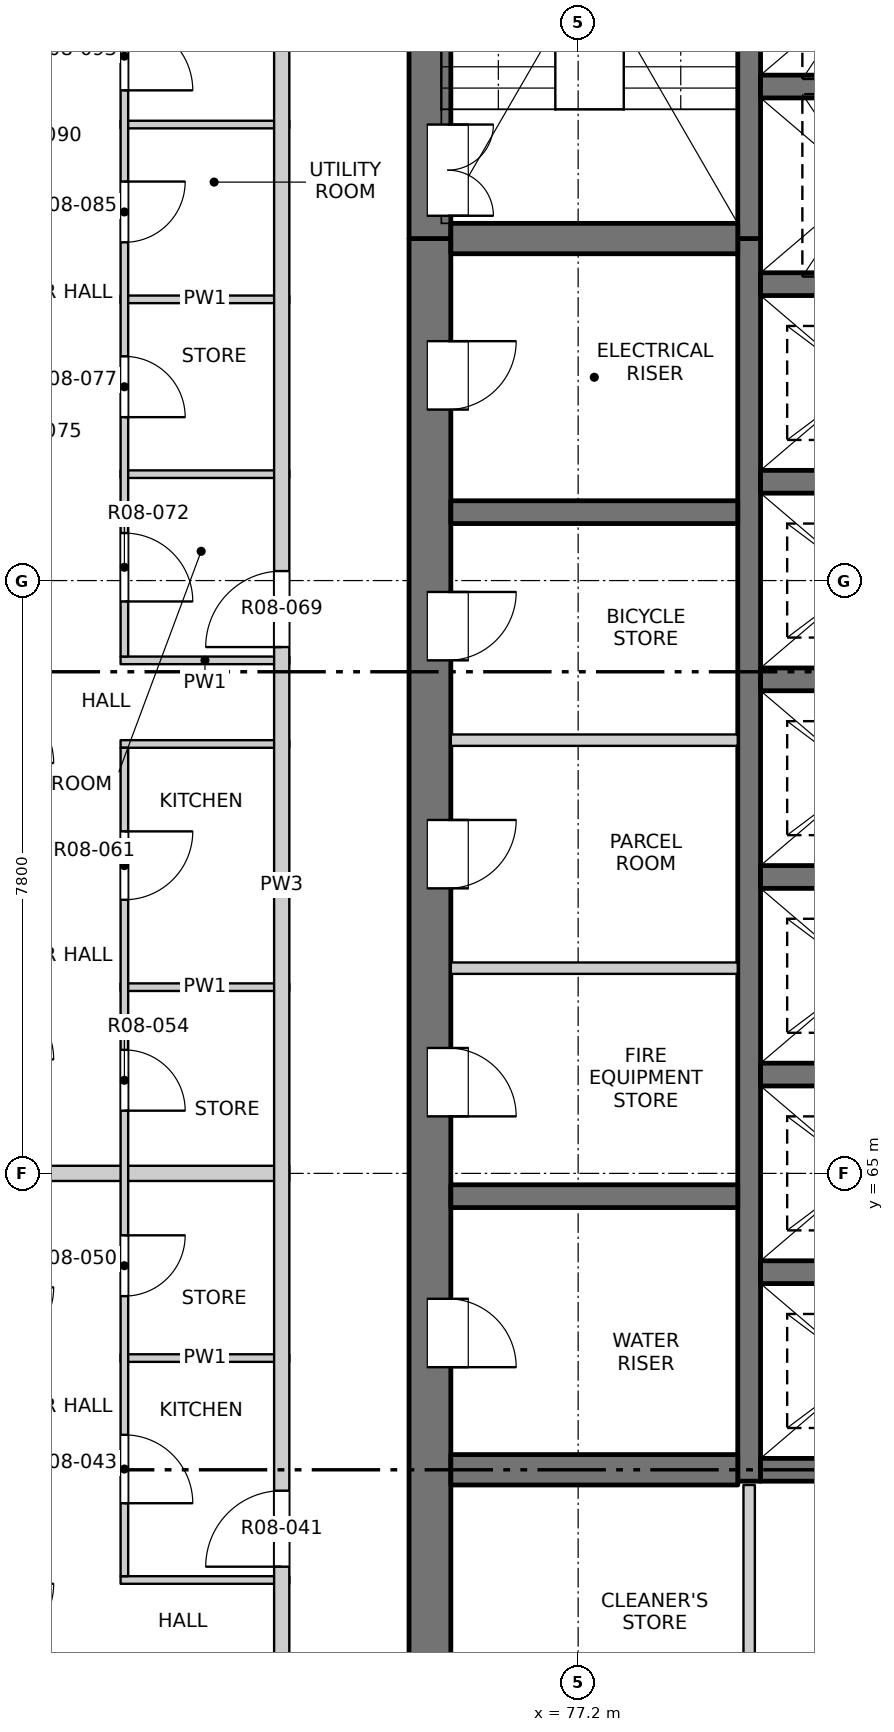
"""IFC4 building model, lengths in metres.
Left out: names, types, materials, properties, quantities, classifications, styles, units other than length and angle.
Written with IfcOpenShell. Run it as: python <this file> out.ifc"""

import sys

from ifc_helpers import new_model, si_unit, direction, frame, frame_2d, origin, place, context, subcontext, project, spatial, rectangle, extrude, element, fill, save


model = new_model("IFC4")
c1 = context("Model", 3, precision=1e-05, world=origin(), true_north=direction((0.0, 1.0)))
c2 = subcontext(c1, "Body", "Model", "MODEL_VIEW")
j1 = project(units=[si_unit("LENGTHUNIT", "METRE"), si_unit("PLANEANGLEUNIT", "RADIAN")], contexts=[c1])
p1 = place(None, origin())
s1 = spatial("IfcSite", under=j1, at=p1, CompositionType="ELEMENT")
p2 = place(p1, origin())
s2 = spatial("IfcBuilding", under=s1, at=p2, CompositionType="ELEMENT")
p3 = place(p2, frame((0.0, 0.0, 103.3)))
s3 = spatial("IfcBuildingStorey", under=s2, at=p3, CompositionType="ELEMENT", Elevation=103.3)
p4 = place(p3, frame((75.25, 54.975, -0.25), z_axis=(0.0, 0.0, 1.0), x_axis=(0.0, 1.0, 0.0)))
e1 = element("IfcWall", 1, at=p4, inside=s3, PredefinedType="SOLIDWALL", context=c2, shape_type="SweptSolid", body=[
    extrude(rectangle(XDim=22.325, YDim=0.55, at=frame_2d((11.163, 0.0))), origin(), (0.0, 0.0, 1.0), 3.4),
])
p5 = place(p4, frame((7.475, 0.0, 0.25)))
e2 = element("IfcOpeningElement", 2, at=p5, cuts=e1, PredefinedType="OPENING", context=c2, shape_type="SweptSolid", body=[
    extrude(rectangle(XDim=0.9, YDim=2.1, at=frame_2d((0.45, 1.05))), frame((0.0, 0.285, 0.0), z_axis=(0.0, -1.0, 0.0), x_axis=(1.0, 0.0, 0.0)), (0.0, 0.0, 1.0), 0.57),
])
p6 = place(p4, frame((10.775, 0.0, 0.25)))
e3 = element("IfcOpeningElement", 3, at=p6, cuts=e1, PredefinedType="OPENING", context=c2, shape_type="SweptSolid", body=[
    extrude(rectangle(XDim=0.9, YDim=2.1, at=frame_2d((0.45, 1.05))), frame((0.0, 0.285, 0.0), z_axis=(0.0, -1.0, 0.0), x_axis=(1.0, 0.0, 0.0)), (0.0, 0.0, 1.0), 0.57),
])
p7 = place(p4, frame((13.775, 0.0, 0.25)))
e4 = element("IfcOpeningElement", 4, at=p7, cuts=e1, PredefinedType="OPENING", context=c2, shape_type="SweptSolid", body=[
    extrude(rectangle(XDim=0.9, YDim=2.1, at=frame_2d((0.45, 1.05))), frame((0.0, 0.285, 0.0), z_axis=(0.0, -1.0, 0.0), x_axis=(1.0, 0.0, 0.0)), (0.0, 0.0, 1.0), 0.57),
])
p8 = place(p4, frame((16.775, 0.0, 0.25)))
e5 = element("IfcOpeningElement", 5, at=p8, cuts=e1, PredefinedType="OPENING", context=c2, shape_type="SweptSolid", body=[
    extrude(rectangle(XDim=0.9, YDim=2.1, at=frame_2d((0.45, 1.05))), frame((0.0, 0.285, 0.0), z_axis=(0.0, -1.0, 0.0), x_axis=(1.0, 0.0, 0.0)), (0.0, 0.0, 1.0), 0.57),
])
p9 = place(p4, frame((20.075, 0.0, 0.25)))
e6 = element("IfcOpeningElement", 6, at=p9, cuts=e1, PredefinedType="OPENING", context=c2, shape_type="SweptSolid", body=[
    extrude(rectangle(XDim=0.9, YDim=2.1, at=frame_2d((0.45, 1.05))), frame((0.0, 0.285, 0.0), z_axis=(0.0, -1.0, 0.0), x_axis=(1.0, 0.0, 0.0)), (0.0, 0.0, 1.0), 0.57),
])
p10 = place(p3, frame((75.25, 77.3, -0.25), z_axis=(0.0, 0.0, 1.0), x_axis=(0.0, 1.0, 0.0)))
e7 = element("IfcWall", 7, at=p10, inside=s3, PredefinedType="SOLIDWALL", context=c2, shape_type="SweptSolid", body=[
    extrude(rectangle(XDim=7.475, YDim=0.55, at=frame_2d((3.737, 0.0))), origin(), (0.0, 0.0, 1.0), 3.4),
])
p11 = place(p10, frame((0.3, 0.0, 0.25)))
e8 = element("IfcOpeningElement", 8, at=p11, cuts=e7, PredefinedType="OPENING", context=c2, shape_type="SweptSolid", body=[
    extrude(rectangle(XDim=1.2, YDim=2.1, at=frame_2d((0.6, 1.05))), frame((0.0, 0.285, 0.0), z_axis=(0.0, -1.0, 0.0), x_axis=(1.0, 0.0, 0.0)), (0.0, 0.0, 1.0), 0.57),
])
p12 = place(p3, frame((79.45, 60.95, -0.25), z_axis=(0.0, 0.0, 1.0), x_axis=(0.0, 1.0, 0.0)))
e9 = element("IfcWall", 9, at=p12, inside=s3, PredefinedType="SOLIDWALL", context=c2, shape_type="SweptSolid", body=[
    extrude(rectangle(XDim=16.35, YDim=0.3, at=frame_2d((8.175, 0.0))), origin(), (0.0, 0.0, 1.0), 3.4),
])
p13 = place(p3, frame((79.45, 77.3, -0.25), z_axis=(0.0, 0.0, 1.0), x_axis=(0.0, 1.0, 0.0)))
e10 = element("IfcWall", 10, at=p13, inside=s3, PredefinedType="SOLIDWALL", context=c2, shape_type="SweptSolid", body=[
    extrude(rectangle(XDim=6.925, YDim=0.3, at=frame_2d((3.462, 0.0))), origin(), (0.0, 0.0, 1.0), 3.4),
])
for number, where, z_axis, x_axis in (
    (11, (79.6, 61.1, -0.25), (0.0, 0.0, 1.0), (1.0, 0.0, 0.0)),
    (12, (79.6, 63.7, -0.25), (0.0, 0.0, 1.0), (1.0, 0.0, 0.0)),
    (13, (79.6, 66.3, -0.25), (0.0, 0.0, 1.0), (1.0, 0.0, 0.0)),
    (14, (79.6, 68.9, -0.25), (0.0, 0.0, 1.0), (1.0, 0.0, 0.0)),
    (15, (79.6, 71.5, -0.25), (0.0, 0.0, 1.0), (1.0, 0.0, 0.0)),
    (16, (79.6, 74.1, -0.25), (0.0, 0.0, 1.0), (1.0, 0.0, 0.0)),
    (17, (79.6, 76.7, -0.25), (0.0, 0.0, 1.0), (1.0, 0.0, 0.0)),
    (18, (79.6, 79.3, -0.25), (0.0, 0.0, 1.0), (1.0, 0.0, 0.0)),
):
    element("IfcWall", number, at=place(p3, frame(where, z_axis=z_axis, x_axis=x_axis)), inside=s3, PredefinedType="SOLIDWALL", context=c2, shape_type="SweptSolid", body=[
        extrude(rectangle(XDim=3.0, YDim=0.3, at=frame_2d((1.5, 0.0))), origin(), (0.0, 0.0, 1.0), 3.4),
    ])
p14 = place(p3, frame((75.525, 61.1, -0.25), z_axis=(0.0, 0.0, 1.0), x_axis=(1.0, 0.0, 0.0)))
e19 = element("IfcWall", 19, at=p14, inside=s3, PredefinedType="SOLIDWALL", context=c2, shape_type="SweptSolid", body=[
    extrude(rectangle(XDim=3.775, YDim=0.4, at=frame_2d((1.888, 0.0))), origin(), (0.0, 0.0, 1.0), 3.4),
])
for number, where, z_axis, x_axis in (
    (20, (75.525, 64.7, -0.25), (0.0, 0.0, 1.0), (1.0, 0.0, 0.0)),
    (21, (75.525, 73.7, -0.25), (0.0, 0.0, 1.0), (1.0, 0.0, 0.0)),
):
    element("IfcWall", number, at=place(p3, frame(where, z_axis=z_axis, x_axis=x_axis)), inside=s3, PredefinedType="SOLIDWALL", context=c2, shape_type="SweptSolid", body=[
        extrude(rectangle(XDim=3.775, YDim=0.3, at=frame_2d((1.888, 0.0))), origin(), (0.0, 0.0, 1.0), 3.4),
    ])
p15 = place(p3, frame((75.525, 77.3, -0.25), z_axis=(0.0, 0.0, 1.0), x_axis=(1.0, 0.0, 0.0)))
e22 = element("IfcWall", 22, at=p15, inside=s3, PredefinedType="SOLIDWALL", context=c2, shape_type="SweptSolid", body=[
    extrude(rectangle(XDim=3.775, YDim=0.4, at=frame_2d((1.888, 0.0))), origin(), (0.0, 0.0, 1.0), 3.4),
])
for number, where, z_axis, x_axis in (
    (23, (71.18, 59.65, 0.0), (0.0, 0.0, 1.0), (1.0, 0.0, 0.0)),
    (24, (71.18, 62.57, 0.0), (0.0, 0.0, 1.0), (1.0, 0.0, 0.0)),
):
    element("IfcWall", number, at=place(p3, frame(where, z_axis=z_axis, x_axis=x_axis)), inside=s3, PredefinedType="PARTITIONING", context=c2, shape_type="SweptSolid", body=[
        extrude(rectangle(XDim=2.22, YDim=0.1, at=frame_2d((1.11, 0.0))), origin(), (0.0, 0.0, 1.0), 3.15),
    ])
p16 = place(p3, frame((65.8, 65.0, 0.0), z_axis=(0.0, 0.0, 1.0), x_axis=(1.0, 0.0, 0.0)))
e25 = element("IfcWall", 25, at=p16, inside=s3, PredefinedType="PARTITIONING", context=c2, shape_type="SweptSolid", body=[
    extrude(rectangle(XDim=7.6, YDim=0.2, at=frame_2d((3.8, 0.0))), origin(), (0.0, 0.0, 1.0), 3.15),
])
p17 = place(p3, frame((71.18, 67.45, 0.0), z_axis=(0.0, 0.0, 1.0), x_axis=(1.0, 0.0, 0.0)))
e26 = element("IfcWall", 26, at=p17, inside=s3, PredefinedType="PARTITIONING", context=c2, shape_type="SweptSolid", body=[
    extrude(rectangle(XDim=2.22, YDim=0.1, at=frame_2d((1.11, 0.0))), origin(), (0.0, 0.0, 1.0), 3.15),
])
p18 = place(p3, frame((75.525, 67.7, 0.0), z_axis=(0.0, 0.0, 1.0), x_axis=(1.0, 0.0, 0.0)))
e27 = element("IfcWall", 27, at=p18, inside=s3, PredefinedType="PARTITIONING", context=c2, shape_type="SweptSolid", body=[
    extrude(rectangle(XDim=3.775, YDim=0.15, at=frame_2d((1.887, 0.0))), origin(), (0.0, 0.0, 1.0), 3.15),
])
p19 = place(p3, frame((71.18, 70.65, 0.0), z_axis=(0.0, 0.0, 1.0), x_axis=(1.0, 0.0, 0.0)))
e28 = element("IfcWall", 28, at=p19, inside=s3, PredefinedType="PARTITIONING", context=c2, shape_type="SweptSolid", body=[
    extrude(rectangle(XDim=2.22, YDim=0.1, at=frame_2d((1.11, 0.0))), origin(), (0.0, 0.0, 1.0), 3.15),
])
p20 = place(p3, frame((75.525, 70.7, 0.0), z_axis=(0.0, 0.0, 1.0), x_axis=(1.0, 0.0, 0.0)))
e29 = element("IfcWall", 29, at=p20, inside=s3, PredefinedType="PARTITIONING", context=c2, shape_type="SweptSolid", body=[
    extrude(rectangle(XDim=3.775, YDim=0.15, at=frame_2d((1.887, 0.0))), origin(), (0.0, 0.0, 1.0), 3.15),
])
for number, where, z_axis, x_axis in (
    (30, (71.18, 71.75, 0.0), (0.0, 0.0, 1.0), (1.0, 0.0, 0.0)),
    (31, (71.18, 74.2, 0.0), (0.0, 0.0, 1.0), (1.0, 0.0, 0.0)),
):
    element("IfcWall", number, at=place(p3, frame(where, z_axis=z_axis, x_axis=x_axis)), inside=s3, PredefinedType="PARTITIONING", context=c2, shape_type="SweptSolid", body=[
        extrude(rectangle(XDim=2.22, YDim=0.1, at=frame_2d((1.11, 0.0))), origin(), (0.0, 0.0, 1.0), 3.15),
    ])
p21 = place(p3, frame((71.18, 76.5, 0.0), z_axis=(0.0, 0.0, 1.0), x_axis=(1.0, 0.0, 0.0)))
e32 = element("IfcWall", 32, at=p21, inside=s3, PredefinedType="PARTITIONING", context=c2, shape_type="SweptSolid", body=[
    extrude(rectangle(XDim=2.22, YDim=0.1, at=frame_2d((1.11, 0.0))), origin(), (0.0, 0.0, 1.0), 2.55),
])
p22 = place(p3, frame((71.18, 78.8, 0.0), z_axis=(0.0, 0.0, 1.0), x_axis=(1.0, 0.0, 0.0)))
e33 = element("IfcWall", 33, at=p22, inside=s3, PredefinedType="PARTITIONING", context=c2, shape_type="SweptSolid", body=[
    extrude(rectangle(XDim=2.22, YDim=0.1, at=frame_2d((1.11, 0.0))), origin(), (0.0, 0.0, 1.0), 3.15),
])
p23 = place(p3, frame((71.23, 59.7, 0.0), z_axis=(0.0, 0.0, 1.0), x_axis=(0.0, 1.0, 0.0)))
e34 = element("IfcWall", 34, at=p23, inside=s3, PredefinedType="PARTITIONING", context=c2, shape_type="SweptSolid", body=[
    extrude(rectangle(XDim=10.9, YDim=0.1, at=frame_2d((5.45, 0.0))), origin(), (0.0, 0.0, 1.0), 3.15),
])
p24 = place(p23, frame((0.96, 0.0, 0.0)))
e35 = element("IfcOpeningElement", 35, at=p24, cuts=e34, PredefinedType="OPENING", context=c2, shape_type="SweptSolid", body=[
    extrude(rectangle(XDim=0.9, YDim=2.1, at=frame_2d((0.45, 1.05))), frame((0.0, 0.06, 0.0), z_axis=(0.0, -1.0, 0.0), x_axis=(1.0, 0.0, 0.0)), (0.0, 0.0, 1.0), 0.12),
])
p25 = place(p23, frame((3.685, 0.0, 0.0)))
e36 = element("IfcOpeningElement", 36, at=p25, cuts=e34, PredefinedType="OPENING", context=c2, shape_type="SweptSolid", body=[
    extrude(rectangle(XDim=0.8, YDim=2.1, at=frame_2d((0.4, 1.05))), frame((0.0, 0.06, 0.0), z_axis=(0.0, -1.0, 0.0), x_axis=(1.0, 0.0, 0.0)), (0.0, 0.0, 1.0), 0.12),
])
p26 = place(p23, frame((6.125, 0.0, 0.0)))
e37 = element("IfcOpeningElement", 37, at=p26, cuts=e34, PredefinedType="OPENING", context=c2, shape_type="SweptSolid", body=[
    extrude(rectangle(XDim=0.8, YDim=2.1, at=frame_2d((0.4, 1.05))), frame((0.0, 0.06, 0.0), z_axis=(0.0, -1.0, 0.0), x_axis=(1.0, 0.0, 0.0)), (0.0, 0.0, 1.0), 0.12),
])
p27 = place(p23, frame((8.9, 0.0, 0.0)))
e38 = element("IfcOpeningElement", 38, at=p27, cuts=e34, PredefinedType="OPENING", context=c2, shape_type="SweptSolid", body=[
    extrude(rectangle(XDim=0.9, YDim=2.1, at=frame_2d((0.45, 1.05))), frame((0.0, 0.06, 0.0), z_axis=(0.0, -1.0, 0.0), x_axis=(1.0, 0.0, 0.0)), (0.0, 0.0, 1.0), 0.12),
])
p28 = place(p3, frame((71.23, 71.8, 0.0), z_axis=(0.0, 0.0, 1.0), x_axis=(0.0, 1.0, 0.0)))
e39 = element("IfcWall", 39, at=p28, inside=s3, PredefinedType="PARTITIONING", context=c2, shape_type="SweptSolid", body=[
    extrude(rectangle(XDim=8.75, YDim=0.1, at=frame_2d((4.375, 0.0))), origin(), (0.0, 0.0, 1.0), 3.15),
])
p29 = place(p28, frame((0.725, 0.0, 0.0)))
e40 = element("IfcOpeningElement", 40, at=p29, cuts=e39, PredefinedType="OPENING", context=c2, shape_type="SweptSolid", body=[
    extrude(rectangle(XDim=0.9, YDim=2.1, at=frame_2d((0.45, 1.05))), frame((0.0, 0.06, 0.0), z_axis=(0.0, -1.0, 0.0), x_axis=(1.0, 0.0, 0.0)), (0.0, 0.0, 1.0), 0.12),
])
p30 = place(p28, frame((3.15, 0.0, 0.0)))
e41 = element("IfcOpeningElement", 41, at=p30, cuts=e39, PredefinedType="OPENING", context=c2, shape_type="SweptSolid", body=[
    extrude(rectangle(XDim=0.8, YDim=2.1, at=frame_2d((0.4, 1.05))), frame((0.0, 0.06, 0.0), z_axis=(0.0, -1.0, 0.0), x_axis=(1.0, 0.0, 0.0)), (0.0, 0.0, 1.0), 0.12),
])
p31 = place(p28, frame((5.45, 0.0, 0.0)))
e42 = element("IfcOpeningElement", 42, at=p31, cuts=e39, PredefinedType="OPENING", context=c2, shape_type="SweptSolid", body=[
    extrude(rectangle(XDim=0.8, YDim=2.1, at=frame_2d((0.4, 1.05))), frame((0.0, 0.06, 0.0), z_axis=(0.0, -1.0, 0.0), x_axis=(1.0, 0.0, 0.0)), (0.0, 0.0, 1.0), 0.12),
])
p32 = place(p28, frame((7.45, 0.0, 0.0)))
e43 = element("IfcOpeningElement", 43, at=p32, cuts=e39, PredefinedType="OPENING", context=c2, shape_type="SweptSolid", body=[
    extrude(rectangle(XDim=0.9, YDim=2.1, at=frame_2d((0.45, 1.05))), frame((0.0, 0.06, 0.0), z_axis=(0.0, -1.0, 0.0), x_axis=(1.0, 0.0, 0.0)), (0.0, 0.0, 1.0), 0.12),
])
p33 = place(p3, frame((73.3, 53.4, 0.0), z_axis=(0.0, 0.0, 1.0), x_axis=(0.0, 1.0, 0.0)))
e44 = element("IfcWall", 44, at=p33, inside=s3, PredefinedType="PARTITIONING", context=c2, shape_type="SweptSolid", body=[
    extrude(rectangle(XDim=30.8, YDim=0.2, at=frame_2d((15.4, 0.0))), origin(), (0.0, 0.0, 1.0), 3.15),
])
p34 = place(p33, frame((6.425, 0.0, 0.0)))
e45 = element("IfcOpeningElement", 45, at=p34, cuts=e44, PredefinedType="OPENING", context=c2, shape_type="SweptSolid", body=[
    extrude(rectangle(XDim=1.0, YDim=2.1, at=frame_2d((0.5, 1.05))), frame((0.0, 0.11, 0.0), z_axis=(0.0, -1.0, 0.0), x_axis=(1.0, 0.0, 0.0)), (0.0, 0.0, 1.0), 0.22),
])
p35 = place(p33, frame((18.525, 0.0, 0.0)))
e46 = element("IfcOpeningElement", 46, at=p35, cuts=e44, PredefinedType="OPENING", context=c2, shape_type="SweptSolid", body=[
    extrude(rectangle(XDim=1.0, YDim=2.1, at=frame_2d((0.5, 1.05))), frame((0.0, 0.11, 0.0), z_axis=(0.0, -1.0, 0.0), x_axis=(1.0, 0.0, 0.0)), (0.0, 0.0, 1.0), 0.22),
])
p36 = place(p3, frame((79.45, 55.525, 0.0), z_axis=(0.0, 0.0, 1.0), x_axis=(0.0, 1.0, 0.0)))
e47 = element("IfcWall", 47, at=p36, inside=s3, PredefinedType="PARTITIONING", context=c2, shape_type="SweptSolid", body=[
    extrude(rectangle(XDim=5.375, YDim=0.15, at=frame_2d((2.688, 0.0))), origin(), (0.0, 0.0, 1.0), 3.15),
])
p37 = place(p36, frame((2.175, 0.0, 0.0)))
e48 = element("IfcOpeningElement", 48, at=p37, cuts=e47, PredefinedType="OPENING", context=c2, shape_type="SweptSolid", body=[
    extrude(rectangle(XDim=0.9, YDim=2.1, at=frame_2d((0.45, 1.05))), frame((0.0, 0.085, 0.0), z_axis=(0.0, -1.0, 0.0), x_axis=(1.0, 0.0, 0.0)), (0.0, 0.0, 1.0), 0.17),
])
p38 = place(p34, origin())
e49 = element("IfcDoor", 49, at=p38, inside=s3, OperationType="SINGLE_SWING_RIGHT", PredefinedType="DOOR", context=c2, shape_type="SweptSolid", body=[
    extrude(rectangle(XDim=1.0, YDim=2.1, at=frame_2d((0.5, 1.05))), frame((0.0, 0.025, 0.0), z_axis=(0.0, -1.0, 0.0), x_axis=(1.0, 0.0, 0.0)), (0.0, 0.0, 1.0), 0.05),
])
fill(e45, e49)
p39 = place(p24, origin())
e50 = element("IfcDoor", 50, at=p39, inside=s3, OperationType="SINGLE_SWING_RIGHT", PredefinedType="DOOR", context=c2, shape_type="SweptSolid", body=[
    extrude(rectangle(XDim=0.9, YDim=2.1, at=frame_2d((0.45, 1.05))), frame((0.0, 0.025, 0.0), z_axis=(0.0, -1.0, 0.0), x_axis=(1.0, 0.0, 0.0)), (0.0, 0.0, 1.0), 0.05),
])
fill(e35, e50)
p40 = place(p5, origin())
e51 = element("IfcDoor", 51, at=p40, inside=s3, OperationType="SINGLE_SWING_RIGHT", PredefinedType="DOOR", context=c2, shape_type="SweptSolid", body=[
    extrude(rectangle(XDim=0.9, YDim=2.1, at=frame_2d((0.45, 1.05))), frame((0.0, -0.21, 0.0), z_axis=(0.0, -1.0, 0.0), x_axis=(1.0, 0.0, 0.0)), (0.0, 0.0, 1.0), 0.05),
])
fill(e2, e51)
p41 = place(p25, origin())
e52 = element("IfcDoor", 52, at=p41, inside=s3, OperationType="SINGLE_SWING_LEFT", PredefinedType="DOOR", context=c2, shape_type="SweptSolid", body=[
    extrude(rectangle(XDim=0.8, YDim=2.1, at=frame_2d((0.4, 1.05))), frame((0.0, 0.025, 0.0), z_axis=(0.0, -1.0, 0.0), x_axis=(1.0, 0.0, 0.0)), (0.0, 0.0, 1.0), 0.05),
])
fill(e36, e52)
p42 = place(p6, origin())
e53 = element("IfcDoor", 53, at=p42, inside=s3, OperationType="SINGLE_SWING_RIGHT", PredefinedType="DOOR", context=c2, shape_type="SweptSolid", body=[
    extrude(rectangle(XDim=0.9, YDim=2.1, at=frame_2d((0.45, 1.05))), frame((0.0, -0.21, 0.0), z_axis=(0.0, -1.0, 0.0), x_axis=(1.0, 0.0, 0.0)), (0.0, 0.0, 1.0), 0.05),
])
fill(e3, e53)
p43 = place(p26, origin())
e54 = element("IfcDoor", 54, at=p43, inside=s3, OperationType="SINGLE_SWING_RIGHT", PredefinedType="DOOR", context=c2, shape_type="SweptSolid", body=[
    extrude(rectangle(XDim=0.8, YDim=2.1, at=frame_2d((0.4, 1.05))), frame((0.0, 0.025, 0.0), z_axis=(0.0, -1.0, 0.0), x_axis=(1.0, 0.0, 0.0)), (0.0, 0.0, 1.0), 0.05),
])
fill(e37, e54)
p44 = place(p27, origin())
e55 = element("IfcDoor", 55, at=p44, inside=s3, OperationType="SINGLE_SWING_LEFT", PredefinedType="DOOR", context=c2, shape_type="SweptSolid", body=[
    extrude(rectangle(XDim=0.9, YDim=2.1, at=frame_2d((0.45, 1.05))), frame((0.0, 0.025, 0.0), z_axis=(0.0, -1.0, 0.0), x_axis=(1.0, 0.0, 0.0)), (0.0, 0.0, 1.0), 0.05),
])
fill(e38, e55)
p45 = place(p7, origin())
e56 = element("IfcDoor", 56, at=p45, inside=s3, OperationType="SINGLE_SWING_LEFT", PredefinedType="DOOR", context=c2, shape_type="SweptSolid", body=[
    extrude(rectangle(XDim=0.9, YDim=2.1, at=frame_2d((0.45, 1.05))), frame((0.0, -0.21, 0.0), z_axis=(0.0, -1.0, 0.0), x_axis=(1.0, 0.0, 0.0)), (0.0, 0.0, 1.0), 0.05),
])
fill(e4, e56)
p46 = place(p8, origin())
e57 = element("IfcDoor", 57, at=p46, inside=s3, OperationType="SINGLE_SWING_LEFT", PredefinedType="DOOR", context=c2, shape_type="SweptSolid", body=[
    extrude(rectangle(XDim=0.9, YDim=2.1, at=frame_2d((0.45, 1.05))), frame((0.0, -0.21, 0.0), z_axis=(0.0, -1.0, 0.0), x_axis=(1.0, 0.0, 0.0)), (0.0, 0.0, 1.0), 0.05),
])
fill(e5, e57)
p47 = place(p35, origin())
e58 = element("IfcDoor", 58, at=p47, inside=s3, OperationType="SINGLE_SWING_RIGHT", PredefinedType="DOOR", context=c2, shape_type="SweptSolid", body=[
    extrude(rectangle(XDim=1.0, YDim=2.1, at=frame_2d((0.5, 1.05))), frame((0.0, 0.025, 0.0), z_axis=(0.0, -1.0, 0.0), x_axis=(1.0, 0.0, 0.0)), (0.0, 0.0, 1.0), 0.05),
])
fill(e46, e58)
p48 = place(p29, origin())
e59 = element("IfcDoor", 59, at=p48, inside=s3, OperationType="SINGLE_SWING_RIGHT", PredefinedType="DOOR", context=c2, shape_type="SweptSolid", body=[
    extrude(rectangle(XDim=0.9, YDim=2.1, at=frame_2d((0.45, 1.05))), frame((0.0, 0.025, 0.0), z_axis=(0.0, -1.0, 0.0), x_axis=(1.0, 0.0, 0.0)), (0.0, 0.0, 1.0), 0.05),
])
fill(e40, e59)
p49 = place(p30, origin())
e60 = element("IfcDoor", 60, at=p49, inside=s3, OperationType="SINGLE_SWING_RIGHT", PredefinedType="DOOR", context=c2, shape_type="SweptSolid", body=[
    extrude(rectangle(XDim=0.8, YDim=2.1, at=frame_2d((0.4, 1.05))), frame((0.0, 0.025, 0.0), z_axis=(0.0, -1.0, 0.0), x_axis=(1.0, 0.0, 0.0)), (0.0, 0.0, 1.0), 0.05),
])
fill(e41, e60)
p50 = place(p9, origin())
e61 = element("IfcDoor", 61, at=p50, inside=s3, OperationType="SINGLE_SWING_LEFT", PredefinedType="DOOR", context=c2, shape_type="SweptSolid", body=[
    extrude(rectangle(XDim=0.9, YDim=2.1, at=frame_2d((0.45, 1.05))), frame((0.0, -0.21, 0.0), z_axis=(0.0, -1.0, 0.0), x_axis=(1.0, 0.0, 0.0)), (0.0, 0.0, 1.0), 0.05),
])
fill(e6, e61)
p51 = place(p31, origin())
e62 = element("IfcDoor", 62, at=p51, inside=s3, OperationType="SINGLE_SWING_LEFT", PredefinedType="DOOR", context=c2, shape_type="SweptSolid", body=[
    extrude(rectangle(XDim=0.8, YDim=2.1, at=frame_2d((0.4, 1.05))), frame((0.0, 0.025, 0.0), z_axis=(0.0, -1.0, 0.0), x_axis=(1.0, 0.0, 0.0)), (0.0, 0.0, 1.0), 0.05),
])
fill(e42, e62)
p52 = place(p11, origin())
e63 = element("IfcDoor", 63, at=p52, inside=s3, OperationType="DOUBLE_DOOR_SINGLE_SWING", PredefinedType="DOOR", context=c2, shape_type="SweptSolid", body=[
    extrude(rectangle(XDim=1.2, YDim=2.1, at=frame_2d((0.6, 1.05))), frame((0.0, -0.21, 0.0), z_axis=(0.0, -1.0, 0.0), x_axis=(1.0, 0.0, 0.0)), (0.0, 0.0, 1.0), 0.05),
])
fill(e8, e63)
p53 = place(p32, origin())
e64 = element("IfcDoor", 64, at=p53, inside=s3, OperationType="SINGLE_SWING_RIGHT", PredefinedType="DOOR", context=c2, shape_type="SweptSolid", body=[
    extrude(rectangle(XDim=0.9, YDim=2.1, at=frame_2d((0.45, 1.05))), frame((0.0, 0.025, 0.0), z_axis=(0.0, -1.0, 0.0), x_axis=(1.0, 0.0, 0.0)), (0.0, 0.0, 1.0), 0.05),
])
fill(e43, e64)
save(model, sys.argv[1])
